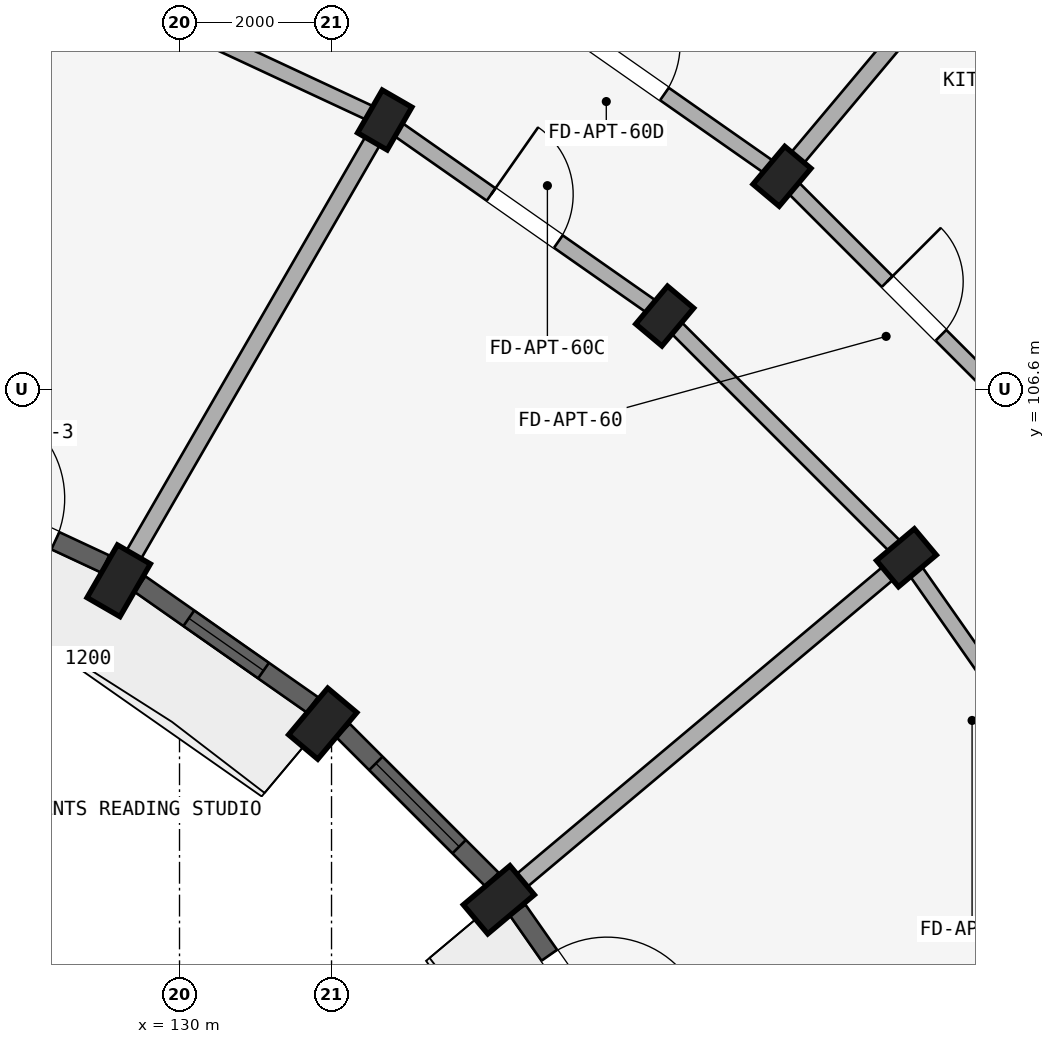
"""IFC4 building model, lengths in metres.
Left out: names, types, materials, properties, quantities, classifications, styles, units other than length and angle.
Written with IfcOpenShell. Run it as: python <this file> out.ifc"""

import sys

from ifc_helpers import new_model, si_unit, direction, frame, frame_2d, origin, origin_2d, place, context, subcontext, project, spatial, rectangle, extrude, element, fill, save


model = new_model("IFC4")
c1 = context("Model", 3, precision=1e-05, world=origin(), true_north=direction((0.0, 1.0)))
c2 = subcontext(c1, "Body", "Model", "MODEL_VIEW")
j1 = project(units=[si_unit("LENGTHUNIT", "METRE"), si_unit("PLANEANGLEUNIT", "RADIAN")], contexts=[c1])
p1 = place(None, origin())
s1 = spatial("IfcSite", under=j1, at=p1, CompositionType="ELEMENT")
p2 = place(p1, origin())
s2 = spatial("IfcBuilding", under=s1, at=p2, CompositionType="ELEMENT")
p3 = place(p2, frame((0.0, 0.0, 27.6)))
s3 = spatial("IfcBuildingStorey", under=s2, at=p3, CompositionType="ELEMENT", Elevation=27.6)
p4 = place(p3, frame((129.2, 104.081, 0.0), z_axis=(0.0, 0.0, 1.0), x_axis=(-0.866025403784, 0.5, 0.0)))
e1 = element("IfcColumn", 1, at=p4, inside=s3, PredefinedType="COLUMN", context=c2, shape_type="SweptSolid", body=[
    extrude(rectangle(XDim=0.5, YDim=0.8, at=origin_2d()), origin(), (0.0, 0.0, 1.0), 2.93),
])
p5 = place(p3, frame((132.7, 110.144, 0.0), z_axis=(0.0, 0.0, 1.0), x_axis=(-0.866025403784, 0.5, 0.0)))
e2 = element("IfcColumn", 2, at=p5, inside=s3, PredefinedType="COLUMN", context=c2, shape_type="SweptSolid", body=[
    extrude(rectangle(XDim=0.45, YDim=0.65, at=origin_2d()), origin(), (0.0, 0.0, 1.0), 2.93),
])
p6 = place(p3, frame((131.885, 102.202, 0.0), z_axis=(0.0, 0.0, 1.0), x_axis=(-0.766044443119, 0.642787609687, 0.0)))
e3 = element("IfcColumn", 3, at=p6, inside=s3, PredefinedType="COLUMN", context=c2, shape_type="SweptSolid", body=[
    extrude(rectangle(XDim=0.5, YDim=0.8, at=origin_2d()), origin(), (0.0, 0.0, 1.0), 2.93),
])
for number, where, z_axis, x_axis in (
    (4, (136.384, 107.564, 0.0), (0.0, 0.0, 1.0), (-0.766, 0.643, 0.0)),
    (5, (137.927, 109.402, 0.0), (0.0, 0.0, 1.0), (-0.766, 0.643, 0.0)),
):
    element("IfcColumn", number, at=place(p3, frame(where, z_axis=z_axis, x_axis=x_axis)), inside=s3, PredefinedType="COLUMN", context=c2, shape_type="SweptSolid", body=[
        extrude(rectangle(XDim=0.45, YDim=0.65, at=origin_2d()), origin(), (0.0, 0.0, 1.0), 2.93),
    ])
p7 = place(p3, frame((134.202, 99.885, 0.0), z_axis=(0.0, 0.0, 1.0), x_axis=(-0.642787609687, 0.766044443119, 0.0)))
e6 = element("IfcColumn", 6, at=p7, inside=s3, PredefinedType="COLUMN", context=c2, shape_type="SweptSolid", body=[
    extrude(rectangle(XDim=0.5, YDim=0.8, at=origin_2d()), origin(), (0.0, 0.0, 1.0), 2.93),
])
p8 = place(p3, frame((139.564, 104.384, 0.0), z_axis=(0.0, 0.0, 1.0), x_axis=(-0.642787609687, 0.766044443119, 0.0)))
e7 = element("IfcColumn", 7, at=p8, inside=s3, PredefinedType="COLUMN", context=c2, shape_type="SweptSolid", body=[
    extrude(rectangle(XDim=0.45, YDim=0.65, at=origin_2d()), origin(), (0.0, 0.0, 1.0), 2.93),
])
p9 = place(p3, frame((128.624, 112.044, 0.0), z_axis=(0.0, 0.0, 1.0), x_axis=(0.906307919131, -0.422617978463, 0.0)))
e8 = element("IfcWall", 8, at=p9, inside=s3, PredefinedType="STANDARD", context=c2, shape_type="SweptSolid", body=[
    extrude(rectangle(XDim=4.497, YDim=0.2, at=frame_2d((2.249, 0.0))), origin(), (0.0, 0.0, 1.0), 2.372),
])
p10 = place(p3, frame((132.7, 110.144, 0.0), z_axis=(0.0, 0.0, 1.0), x_axis=(0.819155404658, -0.573571637217, 0.0)))
e9 = element("IfcWall", 9, at=p10, inside=s3, PredefinedType="STANDARD", context=c2, shape_type="SweptSolid", body=[
    extrude(rectangle(XDim=4.497, YDim=0.2, at=frame_2d((2.249, 0.0))), origin(), (0.0, 0.0, 1.0), 2.372),
])
p11 = place(p10, frame((1.709, 0.0, 0.0)))
e10 = element("IfcOpeningElement", 10, at=p11, cuts=e9, PredefinedType="OPENING", context=c2, shape_type="SweptSolid", body=[
    extrude(rectangle(XDim=1.08, YDim=2.15, at=frame_2d((0.54, 1.075))), frame((0.0, 0.11, 0.0), z_axis=(0.0, -1.0, 0.0), x_axis=(1.0, 0.0, 0.0)), (0.0, 0.0, 1.0), 0.22),
])
p12 = place(p3, frame((133.9, 112.222, 0.0), z_axis=(0.0, 0.0, 1.0), x_axis=(0.819140911474, -0.573592335331, 0.0)))
e11 = element("IfcWall", 11, at=p12, inside=s3, PredefinedType="STANDARD", context=c2, shape_type="SweptSolid", body=[
    extrude(rectangle(XDim=4.916, YDim=0.2, at=frame_2d((2.458, 0.0))), origin(), (0.0, 0.0, 1.0), 2.372),
])
p13 = place(p12, frame((1.888, 0.0, 0.0)))
e12 = element("IfcOpeningElement", 12, at=p13, cuts=e11, PredefinedType="OPENING", context=c2, shape_type="SweptSolid", body=[
    extrude(rectangle(XDim=1.14, YDim=2.15, at=frame_2d((0.57, 1.075))), frame((0.0, 0.11, 0.0), z_axis=(0.0, -1.0, 0.0), x_axis=(1.0, 0.0, 0.0)), (0.0, 0.0, 1.0), 0.22),
])
p14 = place(p3, frame((136.384, 107.564, 0.0), z_axis=(0.0, 0.0, 1.0), x_axis=(0.707106781187, -0.707106781187, 0.0)))
e13 = element("IfcWall", 13, at=p14, inside=s3, PredefinedType="STANDARD", context=c2, shape_type="SweptSolid", body=[
    extrude(rectangle(XDim=4.497, YDim=0.2, at=frame_2d((2.249, 0.0))), origin(), (0.0, 0.0, 1.0), 2.372),
])
p15 = place(p3, frame((137.927, 109.402, 0.0), z_axis=(0.0, 0.0, 1.0), x_axis=(0.707106781187, -0.707106781187, 0.0)))
e14 = element("IfcWall", 14, at=p15, inside=s3, PredefinedType="STANDARD", context=c2, shape_type="SweptSolid", body=[
    extrude(rectangle(XDim=4.916, YDim=0.2, at=frame_2d((2.458, 0.0))), origin(), (0.0, 0.0, 1.0), 2.372),
])
p16 = place(p15, frame((1.958, 0.0, 0.0)))
e15 = element("IfcOpeningElement", 15, at=p16, cuts=e14, PredefinedType="OPENING", context=c2, shape_type="SweptSolid", body=[
    extrude(rectangle(XDim=1.0, YDim=2.15, at=frame_2d((0.5, 1.075))), frame((0.0, 0.11, 0.0), z_axis=(0.0, -1.0, 0.0), x_axis=(1.0, 0.0, 0.0)), (0.0, 0.0, 1.0), 0.22),
])
p17 = place(p3, frame((139.564, 104.384, 0.0), z_axis=(0.0, 0.0, 1.0), x_axis=(0.573571637217, -0.819155404658, 0.0)))
e16 = element("IfcWall", 16, at=p17, inside=s3, PredefinedType="STANDARD", context=c2, shape_type="SweptSolid", body=[
    extrude(rectangle(XDim=4.497, YDim=0.2, at=frame_2d((2.249, 0.0))), origin(), (0.0, 0.0, 1.0), 2.372),
])
p18 = place(p17, frame((1.749, 0.0, 0.0)))
e17 = element("IfcOpeningElement", 17, at=p18, cuts=e16, PredefinedType="OPENING", context=c2, shape_type="SweptSolid", body=[
    extrude(rectangle(XDim=1.0, YDim=2.15, at=frame_2d((0.5, 1.075))), frame((0.0, 0.11, 0.0), z_axis=(0.0, -1.0, 0.0), x_axis=(1.0, 0.0, 0.0)), (0.0, 0.0, 1.0), 0.22),
])
p19 = place(p3, frame((129.3, 104.254, 0.0), z_axis=(0.0, 0.0, 1.0), x_axis=(0.499997969693, 0.866026575979, 0.0)))
e18 = element("IfcWall", 18, at=p19, inside=s3, PredefinedType="STANDARD", context=c2, shape_type="SweptSolid", body=[
    extrude(rectangle(XDim=6.75, YDim=0.22, at=frame_2d((3.375, 0.0))), origin(), (0.0, 0.0, 1.0), 2.372),
])
p20 = place(p3, frame((137.991, 109.479, 0.0), z_axis=(0.0, 0.0, 1.0), x_axis=(0.642784757967, 0.766046835987, 0.0)))
e19 = element("IfcWall", 19, at=p20, inside=s3, PredefinedType="STANDARD", context=c2, shape_type="SweptSolid", body=[
    extrude(rectangle(XDim=17.42, YDim=0.22, at=frame_2d((8.71, 0.0))), origin(), (0.0, 0.0, 1.0), 2.372),
])
p21 = place(p3, frame((134.355, 100.013, 0.0), z_axis=(0.0, 0.0, 1.0), x_axis=(0.766046761698, 0.642784846501, 0.0)))
e20 = element("IfcWall", 20, at=p21, inside=s3, PredefinedType="STANDARD", context=c2, shape_type="SweptSolid", body=[
    extrude(rectangle(XDim=6.75, YDim=0.22, at=frame_2d((3.375, 0.0))), origin(), (0.0, 0.0, 1.0), 2.372),
])
p22 = place(p3, frame((126.513, 105.472, 0.0), z_axis=(0.0, 0.0, 1.0), x_axis=(0.906293449611, -0.422649007088, 0.0)))
e21 = element("IfcWall", 21, at=p22, inside=s3, PredefinedType="STANDARD", context=c2, shape_type="SweptSolid", body=[
    extrude(rectangle(XDim=2.77, YDim=0.25, at=frame_2d((1.385, 0.0))), origin(), (0.0, 0.0, 1.0), 2.472),
])
p23 = place(p22, frame((0.725, 0.0, 0.0)))
e22 = element("IfcOpeningElement", 22, at=p23, cuts=e21, PredefinedType="OPENING", context=c2, shape_type="SweptSolid", body=[
    extrude(rectangle(XDim=1.32, YDim=2.15, at=frame_2d((0.66, 1.075))), frame((0.0, 0.135, 0.0), z_axis=(0.0, -1.0, 0.0), x_axis=(1.0, 0.0, 0.0)), (0.0, 0.0, 1.0), 0.27),
])
p24 = place(p3, frame((129.479, 104.038, 0.0), z_axis=(0.0, 0.0, 1.0), x_axis=(0.819111815273, -0.573633885053, 0.0)))
e23 = element("IfcWall", 23, at=p24, inside=s3, PredefinedType="STANDARD", context=c2, shape_type="SweptSolid", body=[
    extrude(rectangle(XDim=2.77, YDim=0.25, at=frame_2d((1.385, 0.0))), origin(), (0.0, 0.0, 1.0), 2.472),
])
p25 = place(p24, frame((0.785, 0.0, 0.772)))
e24 = element("IfcOpeningElement", 24, at=p25, cuts=e23, PredefinedType="OPENING", context=c2, shape_type="SweptSolid", body=[
    extrude(rectangle(XDim=1.2, YDim=1.5, at=frame_2d((0.6, 0.75))), frame((0.0, 0.135, 0.0), z_axis=(0.0, -1.0, 0.0), x_axis=(1.0, 0.0, 0.0)), (0.0, 0.0, 1.0), 0.27),
])
p26 = place(p3, frame((132.152, 102.111, 0.0), z_axis=(0.0, 0.0, 1.0), x_axis=(0.707106781187, -0.707106781187, 0.0)))
e25 = element("IfcWall", 25, at=p26, inside=s3, PredefinedType="STANDARD", context=c2, shape_type="SweptSolid", body=[
    extrude(rectangle(XDim=2.77, YDim=0.25, at=frame_2d((1.385, 0.0))), origin(), (0.0, 0.0, 1.0), 2.472),
])
p27 = place(p26, frame((0.61, 0.0, 0.672)))
e26 = element("IfcOpeningElement", 26, at=p27, cuts=e25, PredefinedType="OPENING", context=c2, shape_type="SweptSolid", body=[
    extrude(rectangle(XDim=1.55, YDim=1.6, at=frame_2d((0.775, 0.8))), frame((0.0, 0.135, 0.0), z_axis=(0.0, -1.0, 0.0), x_axis=(1.0, 0.0, 0.0)), (0.0, 0.0, 1.0), 0.27),
])
p28 = place(p3, frame((134.449, 99.748, 0.0), z_axis=(0.0, 0.0, 1.0), x_axis=(0.573633885053, -0.819111815273, 0.0)))
e27 = element("IfcWall", 27, at=p28, inside=s3, PredefinedType="STANDARD", context=c2, shape_type="SweptSolid", body=[
    extrude(rectangle(XDim=2.77, YDim=0.25, at=frame_2d((1.385, 0.0))), origin(), (0.0, 0.0, 1.0), 2.472),
])
p29 = place(p28, frame((0.725, 0.0, 0.0)))
e28 = element("IfcOpeningElement", 28, at=p29, cuts=e27, PredefinedType="OPENING", context=c2, shape_type="SweptSolid", body=[
    extrude(rectangle(XDim=1.32, YDim=2.15, at=frame_2d((0.66, 1.075))), frame((0.0, 0.135, 0.0), z_axis=(0.0, -1.0, 0.0), x_axis=(1.0, 0.0, 0.0)), (0.0, 0.0, 1.0), 0.27),
])
p30 = place(p25, origin())
e29 = element("IfcWindow", 29, at=p30, inside=s3, PartitioningType="SINGLE_PANEL", PredefinedType="WINDOW", context=c2, shape_type="SweptSolid", body=[
    extrude(rectangle(XDim=1.2, YDim=1.5, at=frame_2d((0.6, 0.75))), frame((0.0, 0.03, 0.0), z_axis=(0.0, -1.0, 0.0), x_axis=(1.0, 0.0, 0.0)), (0.0, 0.0, 1.0), 0.06),
])
fill(e24, e29)
p31 = place(p27, origin())
e30 = element("IfcWindow", 30, at=p31, inside=s3, PartitioningType="DOUBLE_PANEL_VERTICAL", PredefinedType="WINDOW", context=c2, shape_type="SweptSolid", body=[
    extrude(rectangle(XDim=1.55, YDim=1.6, at=frame_2d((0.775, 0.8))), frame((0.0, 0.03, 0.0), z_axis=(0.0, -1.0, 0.0), x_axis=(1.0, 0.0, 0.0)), (0.0, 0.0, 1.0), 0.06),
])
fill(e26, e30)
p32 = place(p13, origin())
e31 = element("IfcDoor", 31, at=p32, inside=s3, OperationType="SINGLE_SWING_LEFT", PredefinedType="DOOR", context=c2, shape_type="SweptSolid", body=[
    extrude(rectangle(XDim=1.14, YDim=2.15, at=frame_2d((0.57, 1.075))), frame((0.0, 0.025, 0.0), z_axis=(0.0, -1.0, 0.0), x_axis=(1.0, 0.0, 0.0)), (0.0, 0.0, 1.0), 0.05),
])
fill(e12, e31)
p33 = place(p16, origin())
e32 = element("IfcDoor", 32, at=p33, inside=s3, OperationType="SINGLE_SWING_LEFT", PredefinedType="DOOR", context=c2, shape_type="SweptSolid", body=[
    extrude(rectangle(XDim=1.0, YDim=2.15, at=frame_2d((0.5, 1.075))), frame((0.0, 0.025, 0.0), z_axis=(0.0, -1.0, 0.0), x_axis=(1.0, 0.0, 0.0)), (0.0, 0.0, 1.0), 0.05),
])
fill(e15, e32)
p34 = place(p11, frame((1.08, 0.0, 0.0), z_axis=(0.0, 0.0, 1.0), x_axis=(-1.0, 0.0, 0.0)))
e33 = element("IfcDoor", 33, at=p34, inside=s3, OperationType="SINGLE_SWING_RIGHT", PredefinedType="DOOR", context=c2, shape_type="SweptSolid", body=[
    extrude(rectangle(XDim=1.08, YDim=2.15, at=frame_2d((0.54, 1.075))), frame((0.0, 0.025, 0.0), z_axis=(0.0, -1.0, 0.0), x_axis=(1.0, 0.0, 0.0)), (0.0, 0.0, 1.0), 0.05),
])
fill(e10, e33)
p35 = place(p23, frame((1.32, 0.0, 0.0), z_axis=(0.0, 0.0, 1.0), x_axis=(-1.0, 0.0, 0.0)))
e34 = element("IfcDoor", 34, at=p35, inside=s3, OperationType="SINGLE_SWING_RIGHT", PredefinedType="DOOR", context=c2, shape_type="SweptSolid", body=[
    extrude(rectangle(XDim=1.32, YDim=2.15, at=frame_2d((0.66, 1.075))), frame((0.0, 0.025, 0.0), z_axis=(0.0, -1.0, 0.0), x_axis=(1.0, 0.0, 0.0)), (0.0, 0.0, 1.0), 0.05),
])
fill(e22, e34)
p36 = place(p29, frame((1.32, 0.0, 0.0), z_axis=(0.0, 0.0, 1.0), x_axis=(-1.0, 0.0, 0.0)))
e35 = element("IfcDoor", 35, at=p36, inside=s3, OperationType="SINGLE_SWING_LEFT", PredefinedType="DOOR", context=c2, shape_type="SweptSolid", body=[
    extrude(rectangle(XDim=1.32, YDim=2.15, at=frame_2d((0.66, 1.075))), frame((0.0, 0.025, 0.0), z_axis=(0.0, -1.0, 0.0), x_axis=(1.0, 0.0, 0.0)), (0.0, 0.0, 1.0), 0.05),
])
fill(e28, e35)
save(model, sys.argv[1])
